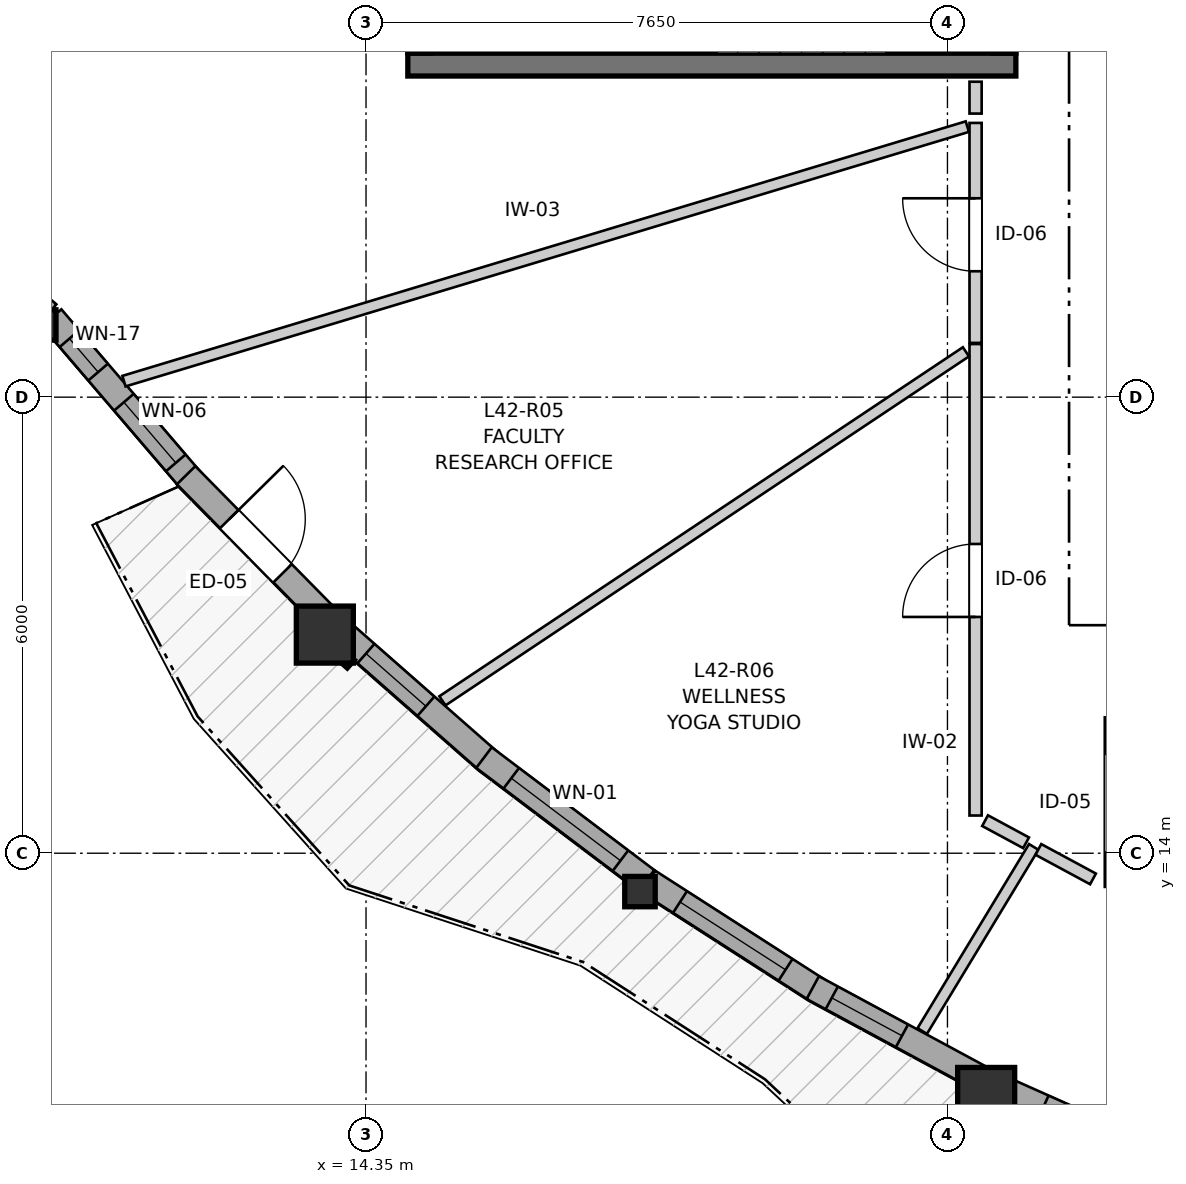
"""IFC4 building model, lengths in metres.
Left out: names, types, materials, properties, quantities, classifications, styles, units other than length and angle.
Written with IfcOpenShell. Run it as: python <this file> out.ifc"""

import sys

from ifc_helpers import new_model, si_unit, direction, frame, frame_2d, origin, origin_2d, place, context, subcontext, project, spatial, rectangle, i_section, extrude, source, transform, mapped, element, fill, save


model = new_model("IFC4")
c1 = context("Model", 3, precision=1e-05, world=origin(), true_north=direction((0.0, 1.0)))
c2 = subcontext(c1, "Body", "Model", "MODEL_VIEW")
j1 = project(units=[si_unit("LENGTHUNIT", "METRE"), si_unit("PLANEANGLEUNIT", "RADIAN")], contexts=[c1])
p1 = place(None, origin())
s1 = spatial("IfcSite", under=j1, at=p1, CompositionType="ELEMENT")
p2 = place(p1, origin())
s2 = spatial("IfcBuilding", under=s1, at=p2, CompositionType="ELEMENT")
p3 = place(p2, frame((0.0, 0.0, 142.6)))
s3 = spatial("IfcBuildingStorey", under=s2, at=p3, CompositionType="ELEMENT", Elevation=142.6)
p4 = place(p3, frame((14.9, 24.375, 0.0), z_axis=(0.0, 0.0, 1.0), x_axis=(1.0, 0.0, 0.0)))
e1 = element("IfcWall", 1, at=p4, inside=s3, PredefinedType="SHEAR", context=c2, shape_type="SweptSolid", body=[
    extrude(rectangle(XDim=8.0, YDim=0.3, at=frame_2d((4.0, 0.0))), origin(), (0.0, 0.0, 1.0), 2.95),
])
p5 = place(p3, frame((15.05, 27.475, 0.0), z_axis=(0.0, 0.0, 1.0), x_axis=(0.0, -1.0, 0.0)))
e2 = element("IfcWall", 2, at=p5, inside=s3, PredefinedType="SHEAR", context=c2, shape_type="SweptSolid", body=[
    extrude(rectangle(XDim=2.95, YDim=0.3, at=frame_2d((1.475, 0.0))), origin(), (0.0, 0.0, 1.0), 2.95),
])
p6 = place(p3, frame((22.75, 24.525, 0.0), z_axis=(0.0, 0.0, 1.0), x_axis=(0.0, 1.0, 0.0)))
e3 = element("IfcWall", 3, at=p6, inside=s3, PredefinedType="SHEAR", context=c2, shape_type="SweptSolid", body=[
    extrude(rectangle(XDim=2.95, YDim=0.3, at=frame_2d((1.475, 0.0))), origin(), (0.0, 0.0, 1.0), 2.95),
])
p7 = place(p6, frame((0.985, 0.0, 0.0)))
e4 = element("IfcOpeningElement", 4, at=p7, cuts=e3, PredefinedType="OPENING", context=c2, shape_type="SweptSolid", body=[
    extrude(rectangle(XDim=0.98, YDim=2.15, at=frame_2d((0.49, 1.075))), frame((0.0, 0.16, 0.0), z_axis=(0.0, -1.0, 0.0), x_axis=(1.0, 0.0, 0.0)), (0.0, 0.0, 1.0), 0.32),
])
m1 = source(origin(), c2, "Body", "SweptSolid", [
    extrude(i_section(OverallWidth=0.401, OverallDepth=0.399, WebThickness=0.023, FlangeThickness=0.036, FilletRadius=0.015, at=origin_2d()), origin(), (0.0, 0.0, 1.0), 2.95),
])
p8 = place(p3, frame((10.071, 20.95, 0.0), z_axis=(0.0, 0.0, 1.0), x_axis=(1.0, 0.0, 0.0)))
e5 = element("IfcColumn", 5, at=p8, inside=s3, PredefinedType="PILASTER", context=c2, shape_type="MappedRepresentation", body=[
    mapped(m1, transform((0.0, 0.0, 0.0), x_axis=(1.0, 0.0, 0.0), y_axis=(0.0, 1.0, 0.0), z_axis=(0.0, 0.0, 1.0), scale=1.0)),
])
m2 = source(origin(), c2, "Body", "SweptSolid", [
    extrude(rectangle(XDim=0.75, YDim=0.75, at=origin_2d()), origin(), (0.0, 0.0, 1.0), 2.95),
])
p9 = place(p3, frame((13.808, 16.876, 0.0), z_axis=(0.0, 0.0, 1.0), x_axis=(1.0, 0.0, 0.0)))
e6 = element("IfcColumn", 6, at=p9, inside=s3, PredefinedType="COLUMN", context=c2, shape_type="MappedRepresentation", body=[
    mapped(m2, transform((0.0, 0.0, 0.0), x_axis=(1.0, 0.0, 0.0), y_axis=(0.0, 1.0, 0.0), z_axis=(0.0, 0.0, 1.0), scale=1.0)),
])
p10 = place(p3, frame((17.954, 13.495, 0.0), z_axis=(0.0, 0.0, 1.0), x_axis=(1.0, 0.0, 0.0)))
e7 = element("IfcColumn", 7, at=p10, inside=s3, PredefinedType="PILASTER", context=c2, shape_type="MappedRepresentation", body=[
    mapped(m1, transform((0.0, 0.0, 0.0), x_axis=(1.0, 0.0, 0.0), y_axis=(0.0, 1.0, 0.0), z_axis=(0.0, 0.0, 1.0), scale=1.0)),
])
p11 = place(p3, frame((22.51, 10.807, 0.0), z_axis=(0.0, 0.0, 1.0), x_axis=(1.0, 0.0, 0.0)))
e8 = element("IfcColumn", 8, at=p11, inside=s3, PredefinedType="COLUMN", context=c2, shape_type="MappedRepresentation", body=[
    mapped(m2, transform((0.0, 0.0, 0.0), x_axis=(1.0, 0.0, 0.0), y_axis=(0.0, 1.0, 0.0), z_axis=(0.0, 0.0, 1.0), scale=1.0)),
])
p12 = place(p3, frame((8.627, 22.406, 0.0), z_axis=(0.0, 0.0, 1.0), x_axis=(0.760379886087, -0.649478582276, 0.0)))
e9 = element("IfcWall", 9, at=p12, inside=s3, PredefinedType="SOLIDWALL", context=c2, shape_type="SweptSolid", body=[
    extrude(rectangle(XDim=2.023, YDim=0.34, at=frame_2d((1.012, 0.0))), origin(), (0.0, 0.0, 1.0), 2.53),
])
p13 = place(p12, frame((0.257, 0.0, 0.82)))
e10 = element("IfcOpeningElement", 10, at=p13, cuts=e9, PredefinedType="OPENING", context=c2, shape_type="SweptSolid", body=[
    extrude(rectangle(XDim=1.45, YDim=1.25, at=frame_2d((0.725, 0.625))), frame((0.0, 0.18, 0.0), z_axis=(0.0, -1.0, 0.0), x_axis=(1.0, 0.0, 0.0)), (0.0, 0.0, 1.0), 0.36),
])
p14 = place(p3, frame((10.213, 21.045, 0.0), z_axis=(0.0, 0.0, 1.0), x_axis=(0.65036245252, -0.759624038819, 0.0)))
e11 = element("IfcWall", 11, at=p14, inside=s3, PredefinedType="SOLIDWALL", context=c2, shape_type="SweptSolid", body=[
    extrude(rectangle(XDim=2.813, YDim=0.34, at=frame_2d((1.407, 0.0))), origin(), (0.0, 0.0, 1.0), 2.53),
])
p15 = place(p14, frame((0.362, 0.0, 0.82)))
e12 = element("IfcOpeningElement", 12, at=p15, cuts=e11, PredefinedType="OPENING", context=c2, shape_type="SweptSolid", body=[
    extrude(rectangle(XDim=0.58, YDim=1.35, at=frame_2d((0.29, 0.675))), frame((0.0, 0.18, 0.0), z_axis=(0.0, -1.0, 0.0), x_axis=(1.0, 0.0, 0.0)), (0.0, 0.0, 1.0), 0.36),
])
p16 = place(p14, frame((1.463, 0.0, 0.82)))
e13 = element("IfcOpeningElement", 13, at=p16, cuts=e11, PredefinedType="OPENING", context=c2, shape_type="SweptSolid", body=[
    extrude(rectangle(XDim=1.05, YDim=1.45, at=frame_2d((0.525, 0.725))), frame((0.0, 0.18, 0.0), z_axis=(0.0, -1.0, 0.0), x_axis=(1.0, 0.0, 0.0)), (0.0, 0.0, 1.0), 0.36),
])
p17 = place(p3, frame((11.983, 18.973, 0.0), z_axis=(0.0, 0.0, 1.0), x_axis=(0.701539452628, -0.712630617084, 0.0)))
e14 = element("IfcWall", 14, at=p17, inside=s3, PredefinedType="SOLIDWALL", context=c2, shape_type="SweptSolid", body=[
    extrude(rectangle(XDim=2.619, YDim=0.34, at=frame_2d((1.31, 0.0))), origin(), (0.0, 0.0, 1.0), 2.53),
])
p18 = place(p17, frame((0.81, 0.0, 0.0)))
e15 = element("IfcOpeningElement", 15, at=p18, cuts=e14, PredefinedType="OPENING", context=c2, shape_type="SweptSolid", body=[
    extrude(rectangle(XDim=1.0, YDim=2.1, at=frame_2d((0.5, 1.05))), frame((0.0, 0.18, 0.0), z_axis=(0.0, -1.0, 0.0), x_axis=(1.0, 0.0, 0.0)), (0.0, 0.0, 1.0), 0.36),
])
p19 = place(p3, frame((14.037, 16.902, 0.0), z_axis=(0.0, 0.0, 1.0), x_axis=(0.751106484969, -0.66018107231, 0.0)))
e16 = element("IfcWall", 16, at=p19, inside=s3, PredefinedType="SOLIDWALL", context=c2, shape_type="SweptSolid", body=[
    extrude(rectangle(XDim=2.575, YDim=0.34, at=frame_2d((1.288, 0.0))), origin(), (0.0, 0.0, 1.0), 2.53),
])
p20 = place(p19, frame((0.416, 0.0, 0.82)))
e17 = element("IfcOpeningElement", 17, at=p20, cuts=e16, PredefinedType="OPENING", context=c2, shape_type="SweptSolid", body=[
    extrude(rectangle(XDim=1.05, YDim=1.45, at=frame_2d((0.525, 0.725))), frame((0.0, 0.18, 0.0), z_axis=(0.0, -1.0, 0.0), x_axis=(1.0, 0.0, 0.0)), (0.0, 0.0, 1.0), 0.36),
])
p21 = place(p3, frame((15.902, 15.258, 0.0), z_axis=(0.0, 0.0, 1.0), x_axis=(0.798071768164, -0.60256240578, 0.0)))
e18 = element("IfcWall", 18, at=p21, inside=s3, PredefinedType="SOLIDWALL", context=c2, shape_type="SweptSolid", body=[
    extrude(rectangle(XDim=2.68, YDim=0.34, at=frame_2d((1.34, 0.0))), origin(), (0.0, 0.0, 1.0), 2.53),
])
p22 = place(p21, frame((0.45, 0.0, 0.82)))
e19 = element("IfcOpeningElement", 19, at=p22, cuts=e18, PredefinedType="OPENING", context=c2, shape_type="SweptSolid", body=[
    extrude(rectangle(XDim=1.8, YDim=1.45, at=frame_2d((0.9, 0.725))), frame((0.0, 0.18, 0.0), z_axis=(0.0, -1.0, 0.0), x_axis=(1.0, 0.0, 0.0)), (0.0, 0.0, 1.0), 0.36),
])
p23 = place(p3, frame((18.063, 13.627, 0.0), z_axis=(0.0, 0.0, 1.0), x_axis=(0.841291581189, -0.540581608475, 0.0)))
e20 = element("IfcWall", 20, at=p23, inside=s3, PredefinedType="SOLIDWALL", context=c2, shape_type="SweptSolid", body=[
    extrude(rectangle(XDim=2.665, YDim=0.34, at=frame_2d((1.332, 0.0))), origin(), (0.0, 0.0, 1.0), 2.53),
])
p24 = place(p23, frame((0.497, 0.0, 0.82)))
e21 = element("IfcOpeningElement", 21, at=p24, cuts=e20, PredefinedType="OPENING", context=c2, shape_type="SweptSolid", body=[
    extrude(rectangle(XDim=1.65, YDim=1.45, at=frame_2d((0.825, 0.725))), frame((0.0, 0.18, 0.0), z_axis=(0.0, -1.0, 0.0), x_axis=(1.0, 0.0, 0.0)), (0.0, 0.0, 1.0), 0.36),
])
p25 = place(p3, frame((20.228, 12.232, 0.0), z_axis=(0.0, 0.0, 1.0), x_axis=(0.879850512407, -0.47525054005, 0.0)))
e22 = element("IfcWall", 22, at=p25, inside=s3, PredefinedType="SOLIDWALL", context=c2, shape_type="SweptSolid", body=[
    extrude(rectangle(XDim=2.53, YDim=0.34, at=frame_2d((1.265, 0.0))), origin(), (0.0, 0.0, 1.0), 2.53),
])
p26 = place(p25, frame((0.284, 0.0, 0.82)))
e23 = element("IfcOpeningElement", 23, at=p26, cuts=e22, PredefinedType="OPENING", context=c2, shape_type="SweptSolid", body=[
    extrude(rectangle(XDim=1.05, YDim=1.45, at=frame_2d((0.525, 0.725))), frame((0.0, 0.18, 0.0), z_axis=(0.0, -1.0, 0.0), x_axis=(1.0, 0.0, 0.0)), (0.0, 0.0, 1.0), 0.36),
])
p27 = place(p3, frame((22.72, 10.899, 0.0), z_axis=(0.0, 0.0, 1.0), x_axis=(0.913229052506, -0.407446558041, 0.0)))
e24 = element("IfcWall", 24, at=p27, inside=s3, PredefinedType="SOLIDWALL", context=c2, shape_type="SweptSolid", body=[
    extrude(rectangle(XDim=2.545, YDim=0.34, at=frame_2d((1.272, 0.0))), origin(), (0.0, 0.0, 1.0), 2.53),
])
p28 = place(p27, frame((0.592, 0.0, 0.82)))
e25 = element("IfcOpeningElement", 25, at=p28, cuts=e24, PredefinedType="OPENING", context=c2, shape_type="SweptSolid", body=[
    extrude(rectangle(XDim=1.35, YDim=1.45, at=frame_2d((0.675, 0.725))), frame((0.0, 0.18, 0.0), z_axis=(0.0, -1.0, 0.0), x_axis=(1.0, 0.0, 0.0)), (0.0, 0.0, 1.0), 0.36),
])
p29 = place(p3, frame((22.37, 14.496, 0.0), z_axis=(0.0, 0.0, 1.0), x_axis=(0.0, 1.0, 0.0)))
e26 = element("IfcWall", 26, at=p29, inside=s3, PredefinedType="PARTITIONING", context=c2, shape_type="SweptSolid", body=[
    extrude(rectangle(XDim=6.203, YDim=0.16, at=frame_2d((3.102, 0.0))), origin(), (0.0, 0.0, 1.0), 2.95),
])
p30 = place(p29, frame((2.613, 0.0, 0.0)))
e27 = element("IfcOpeningElement", 27, at=p30, cuts=e26, PredefinedType="OPENING", context=c2, shape_type="SweptSolid", body=[
    extrude(rectangle(XDim=0.96, YDim=2.1, at=frame_2d((0.48, 1.05))), frame((0.0, 0.09, 0.0), z_axis=(0.0, -1.0, 0.0), x_axis=(1.0, 0.0, 0.0)), (0.0, 0.0, 1.0), 0.18),
])
p31 = place(p3, frame((22.37, 20.714, 0.0), z_axis=(0.0, 0.0, 1.0), x_axis=(0.0, 1.0, 0.0)))
e28 = element("IfcWall", 28, at=p31, inside=s3, PredefinedType="PARTITIONING", context=c2, shape_type="SweptSolid", body=[
    extrude(rectangle(XDim=2.894, YDim=0.16, at=frame_2d((1.447, 0.0))), origin(), (0.0, 0.0, 1.0), 2.95),
])
p32 = place(p31, frame((0.942, 0.0, 0.0)))
e29 = element("IfcOpeningElement", 29, at=p32, cuts=e28, PredefinedType="OPENING", context=c2, shape_type="SweptSolid", body=[
    extrude(rectangle(XDim=0.96, YDim=2.1, at=frame_2d((0.48, 1.05))), frame((0.0, 0.09, 0.0), z_axis=(0.0, -1.0, 0.0), x_axis=(1.0, 0.0, 0.0)), (0.0, 0.0, 1.0), 0.18),
])
p33 = place(p3, frame((24.15, 15.788, 0.0), z_axis=(0.0, 0.0, 1.0), x_axis=(0.0, -1.0, 0.0)))
e30 = element("IfcWall", 30, at=p33, inside=s3, PredefinedType="PARTITIONING", context=c2, shape_type="SweptSolid", body=[
    extrude(rectangle(XDim=2.231, YDim=0.16, at=frame_2d((1.116, 0.0))), origin(), (0.0, 0.0, 1.0), 2.95),
])
p34 = place(p33, frame((0.48, 0.0, 0.0)))
e31 = element("IfcOpeningElement", 31, at=p34, cuts=e30, PredefinedType="OPENING", context=c2, shape_type="SweptSolid", body=[
    extrude(rectangle(XDim=1.3, YDim=2.1, at=frame_2d((0.65, 1.05))), frame((0.0, 0.09, 0.0), z_axis=(0.0, -1.0, 0.0), x_axis=(1.0, 0.0, 0.0)), (0.0, 0.0, 1.0), 0.18),
])
p35 = place(p3, frame((11.165, 20.211, 0.0), z_axis=(0.0, 0.0, 1.0), x_axis=(0.957361241888, 0.288893496865, 0.0)))
e32 = element("IfcWall", 32, at=p35, inside=s3, PredefinedType="PARTITIONING", context=c2, shape_type="SweptSolid", body=[
    extrude(rectangle(XDim=11.59, YDim=0.145, at=frame_2d((5.795, 0.0))), origin(), (0.0, 0.0, 1.0), 2.95),
])
p36 = place(p3, frame((15.355, 16.005, 0.0), z_axis=(0.0, 0.0, 1.0), x_axis=(0.83207298021, 0.55466616591, 0.0)))
e33 = element("IfcWall", 33, at=p36, inside=s3, PredefinedType="PARTITIONING", context=c2, shape_type="SweptSolid", body=[
    extrude(rectangle(XDim=8.278, YDim=0.145, at=frame_2d((4.139, 0.0))), origin(), (0.0, 0.0, 1.0), 2.95),
])
p37 = place(p3, frame((21.668, 11.66, 0.0), z_axis=(0.0, 0.0, 1.0), x_axis=(0.517927198926, 0.855424699557, 0.0)))
e34 = element("IfcWall", 34, at=p37, inside=s3, PredefinedType="PARTITIONING", context=c2, shape_type="SweptSolid", body=[
    extrude(rectangle(XDim=2.832, YDim=0.145, at=frame_2d((1.416, 0.0))), origin(), (0.0, 0.0, 1.0), 2.95),
])
p38 = place(p3, frame((23.196, 14.05, 0.0), z_axis=(0.0, 0.0, 1.0), x_axis=(0.880125284311, -0.474741491673, 0.0)))
e35 = element("IfcWall", 35, at=p38, inside=s3, PredefinedType="PARTITIONING", context=c2, shape_type="SweptSolid", body=[
    extrude(rectangle(XDim=0.817, YDim=0.16, at=frame_2d((0.408, 0.0))), origin(), (0.0, 0.0, 1.0), 2.95),
])
p39 = place(p3, frame((22.495, 14.428, 0.0), z_axis=(0.0, 0.0, 1.0), x_axis=(0.880048601236, -0.474883627285, 0.0)))
e36 = element("IfcWall", 36, at=p39, inside=s3, PredefinedType="PARTITIONING", context=c2, shape_type="SweptSolid", body=[
    extrude(rectangle(XDim=0.613, YDim=0.16, at=frame_2d((0.306, 0.0))), origin(), (0.0, 0.0, 1.0), 2.95),
])
p40 = place(p3, frame((22.37, 23.731, 0.0), z_axis=(0.0, 0.0, 1.0), x_axis=(0.0, 1.0, 0.0)))
e37 = element("IfcWall", 37, at=p40, inside=s3, PredefinedType="PARTITIONING", context=c2, shape_type="SweptSolid", body=[
    extrude(rectangle(XDim=0.419, YDim=0.16, at=frame_2d((0.209, 0.0))), origin(), (0.0, 0.0, 1.0), 2.95),
])
m3 = source(origin(), c2, "Body", "SweptSolid", [
    extrude(rectangle(XDim=0.58, YDim=1.35, at=frame_2d((0.29, 0.675))), frame((0.0, 0.03, 0.0), z_axis=(0.0, -1.0, 0.0), x_axis=(1.0, 0.0, 0.0)), (0.0, 0.0, 1.0), 0.06),
])
p41 = place(p15, origin())
e38 = element("IfcWindow", 38, at=p41, inside=s3, PartitioningType="SINGLE_PANEL", PredefinedType="WINDOW", context=c2, shape_type="MappedRepresentation", body=[
    mapped(m3, transform((0.0, 0.0, 0.0), x_axis=(1.0, 0.0, 0.0), y_axis=(0.0, 1.0, 0.0), z_axis=(0.0, 0.0, 1.0), scale=1.0)),
])
fill(e12, e38)
m4 = source(origin(), c2, "Body", "SweptSolid", [
    extrude(rectangle(XDim=1.05, YDim=1.45, at=frame_2d((0.525, 0.725))), frame((0.0, 0.03, 0.0), z_axis=(0.0, -1.0, 0.0), x_axis=(1.0, 0.0, 0.0)), (0.0, 0.0, 1.0), 0.06),
])
p42 = place(p16, origin())
e39 = element("IfcWindow", 39, at=p42, inside=s3, PartitioningType="SINGLE_PANEL", PredefinedType="WINDOW", context=c2, shape_type="MappedRepresentation", body=[
    mapped(m4, transform((0.0, 0.0, 0.0), x_axis=(1.0, 0.0, 0.0), y_axis=(0.0, 1.0, 0.0), z_axis=(0.0, 0.0, 1.0), scale=1.0)),
])
fill(e13, e39)
p43 = place(p20, origin())
e40 = element("IfcWindow", 40, at=p43, inside=s3, PartitioningType="SINGLE_PANEL", PredefinedType="WINDOW", context=c2, shape_type="MappedRepresentation", body=[
    mapped(m4, transform((0.0, 0.0, 0.0), x_axis=(1.0, 0.0, 0.0), y_axis=(0.0, 1.0, 0.0), z_axis=(0.0, 0.0, 1.0), scale=1.0)),
])
fill(e17, e40)
m5 = source(origin(), c2, "Body", "SweptSolid", [
    extrude(rectangle(XDim=1.8, YDim=1.45, at=frame_2d((0.9, 0.725))), frame((0.0, 0.03, 0.0), z_axis=(0.0, -1.0, 0.0), x_axis=(1.0, 0.0, 0.0)), (0.0, 0.0, 1.0), 0.06),
])
p44 = place(p22, origin())
e41 = element("IfcWindow", 41, at=p44, inside=s3, PartitioningType="SINGLE_PANEL", PredefinedType="WINDOW", context=c2, shape_type="MappedRepresentation", body=[
    mapped(m5, transform((0.0, 0.0, 0.0), x_axis=(1.0, 0.0, 0.0), y_axis=(0.0, 1.0, 0.0), z_axis=(0.0, 0.0, 1.0), scale=1.0)),
])
fill(e19, e41)
m6 = source(origin(), c2, "Body", "SweptSolid", [
    extrude(rectangle(XDim=1.65, YDim=1.45, at=frame_2d((0.825, 0.725))), frame((0.0, 0.03, 0.0), z_axis=(0.0, -1.0, 0.0), x_axis=(1.0, 0.0, 0.0)), (0.0, 0.0, 1.0), 0.06),
])
p45 = place(p24, origin())
e42 = element("IfcWindow", 42, at=p45, inside=s3, PartitioningType="SINGLE_PANEL", PredefinedType="WINDOW", context=c2, shape_type="MappedRepresentation", body=[
    mapped(m6, transform((0.0, 0.0, 0.0), x_axis=(1.0, 0.0, 0.0), y_axis=(0.0, 1.0, 0.0), z_axis=(0.0, 0.0, 1.0), scale=1.0)),
])
fill(e21, e42)
p46 = place(p26, origin())
e43 = element("IfcWindow", 43, at=p46, inside=s3, PartitioningType="SINGLE_PANEL", PredefinedType="WINDOW", context=c2, shape_type="MappedRepresentation", body=[
    mapped(m4, transform((0.0, 0.0, 0.0), x_axis=(1.0, 0.0, 0.0), y_axis=(0.0, 1.0, 0.0), z_axis=(0.0, 0.0, 1.0), scale=1.0)),
])
fill(e23, e43)
m7 = source(origin(), c2, "Body", "SweptSolid", [
    extrude(rectangle(XDim=1.0, YDim=2.1, at=frame_2d((0.5, 1.05))), frame((0.0, 0.025, 0.0), z_axis=(0.0, -1.0, 0.0), x_axis=(1.0, 0.0, 0.0)), (0.0, 0.0, 1.0), 0.05),
])
p47 = place(p18, origin())
e44 = element("IfcDoor", 44, at=p47, inside=s3, OperationType="SINGLE_SWING_LEFT", PredefinedType="DOOR", context=c2, shape_type="MappedRepresentation", body=[
    mapped(m7, transform((0.0, 0.0, 0.0), x_axis=(1.0, 0.0, 0.0), y_axis=(0.0, 1.0, 0.0), z_axis=(0.0, 0.0, 1.0), scale=1.0)),
])
fill(e15, e44)
m8 = source(origin(), c2, "Body", "SweptSolid", [
    extrude(rectangle(XDim=0.96, YDim=2.1, at=frame_2d((0.48, 1.05))), frame((0.0, 0.025, 0.0), z_axis=(0.0, -1.0, 0.0), x_axis=(1.0, 0.0, 0.0)), (0.0, 0.0, 1.0), 0.05),
])
p48 = place(p30, origin())
e45 = element("IfcDoor", 45, at=p48, inside=s3, OperationType="SINGLE_SWING_LEFT", PredefinedType="DOOR", context=c2, shape_type="MappedRepresentation", body=[
    mapped(m8, transform((0.0, 0.0, 0.0), x_axis=(1.0, 0.0, 0.0), y_axis=(0.0, 1.0, 0.0), z_axis=(0.0, 0.0, 1.0), scale=1.0)),
])
fill(e27, e45)
p49 = place(p32, origin())
e46 = element("IfcDoor", 46, at=p49, inside=s3, OperationType="SINGLE_SWING_RIGHT", PredefinedType="DOOR", context=c2, shape_type="MappedRepresentation", body=[
    mapped(m8, transform((0.0, 0.0, 0.0), x_axis=(1.0, 0.0, 0.0), y_axis=(0.0, 1.0, 0.0), z_axis=(0.0, 0.0, 1.0), scale=1.0)),
])
fill(e29, e46)
save(model, sys.argv[1])
